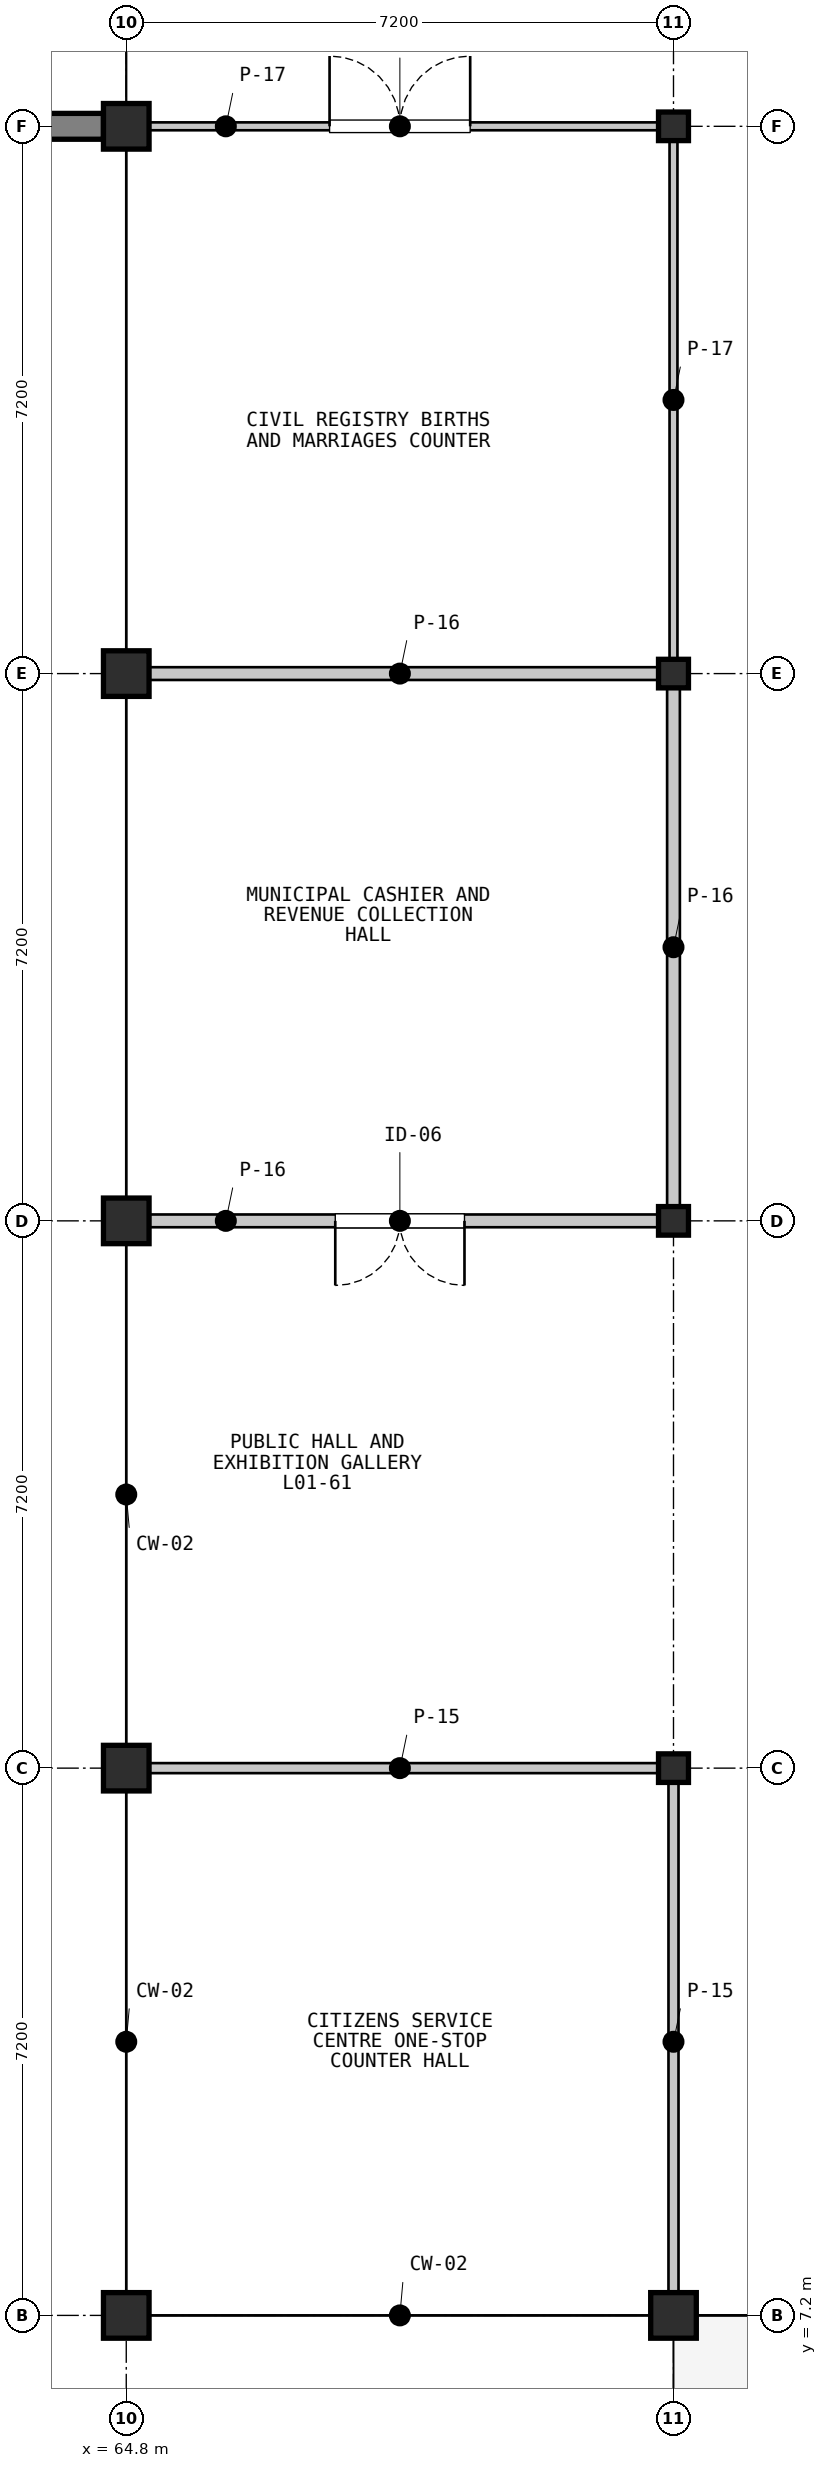
"""IFC4 building model, lengths in metres.
Left out: names, types, materials, properties, quantities, classifications, styles, units other than length and angle.
Written with IfcOpenShell. Run it as: python <this file> out.ifc"""

import sys

from ifc_helpers import new_model, si_unit, direction, frame, frame_2d, origin, origin_2d, place, context, subcontext, project, spatial, rectangle, i_section, extrude, element, fill, save


model = new_model("IFC4")
c1 = context("Model", 3, precision=1e-05, world=origin(), true_north=direction((0.0, 1.0)))
c2 = subcontext(c1, "Body", "Model", "MODEL_VIEW")
j1 = project(units=[si_unit("LENGTHUNIT", "METRE"), si_unit("PLANEANGLEUNIT", "RADIAN")], contexts=[c1])
p1 = place(None, origin())
s1 = spatial("IfcSite", under=j1, at=p1, CompositionType="ELEMENT")
p2 = place(p1, origin())
s2 = spatial("IfcBuilding", under=s1, at=p2, CompositionType="ELEMENT")
p3 = place(p2, origin())
s3 = spatial("IfcBuildingStorey", under=s2, at=p3, CompositionType="ELEMENT", Elevation=0.0)
for number, where, z_axis, x_axis in (
    (1, (64.8, 7.2, 0.0), (0.0, 0.0, 1.0), (1.0, 0.0, 0.0)),
    (2, (64.8, 14.4, 0.0), (0.0, 0.0, 1.0), (1.0, 0.0, 0.0)),
    (3, (64.8, 21.6, 0.0), (0.0, 0.0, 1.0), (1.0, 0.0, 0.0)),
    (4, (64.8, 28.8, 0.0), (0.0, 0.0, 1.0), (1.0, 0.0, 0.0)),
    (5, (64.8, 36.0, 0.0), (0.0, 0.0, 1.0), (1.0, 0.0, 0.0)),
    (6, (72.0, 7.2, 0.0), (0.0, 0.0, 1.0), (1.0, 0.0, 0.0)),
):
    element("IfcColumn", number, at=place(p3, frame(where, z_axis=z_axis, x_axis=x_axis)), inside=s3, PredefinedType="COLUMN", context=c2, shape_type="SweptSolid", body=[
        extrude(rectangle(XDim=0.6, YDim=0.6, at=origin_2d()), origin(), (0.0, 0.0, 1.0), 5.4),
    ])
for number, where, z_axis, x_axis in (
    (7, (72.0, 14.4, 0.0), (0.0, 0.0, 1.0), (1.0, 0.0, 0.0)),
    (8, (72.0, 21.6, 0.0), (0.0, 0.0, 1.0), (1.0, 0.0, 0.0)),
    (9, (72.0, 28.8, 0.0), (0.0, 0.0, 1.0), (1.0, 0.0, 0.0)),
    (10, (72.0, 36.0, 0.0), (0.0, 0.0, 1.0), (1.0, 0.0, 0.0)),
):
    element("IfcColumn", number, at=place(p3, frame(where, z_axis=z_axis, x_axis=x_axis)), inside=s3, PredefinedType="COLUMN", context=c2, shape_type="SweptSolid", body=[
        extrude(i_section(OverallWidth=0.394, OverallDepth=0.376, WebThickness=0.017, FlangeThickness=0.028, FilletRadius=0.015, at=origin_2d()), origin(), (0.0, 0.0, 1.0), 5.4),
    ])
p4 = place(p3, frame((64.5, 36.0, 0.0), z_axis=(0.0, 0.0, 1.0), x_axis=(-1.0, 0.0, 0.0)))
e11 = element("IfcWall", 11, at=p4, inside=s3, PredefinedType="SOLIDWALL", context=c2, shape_type="SweptSolid", body=[
    extrude(rectangle(XDim=6.6, YDim=0.34, at=frame_2d((3.3, 0.0))), origin(), (0.0, 0.0, 1.0), 4.598),
])
p5 = place(p4, frame((0.984, 0.0, 0.95)))
e12 = element("IfcOpeningElement", 12, at=p5, cuts=e11, PredefinedType="OPENING", context=c2, shape_type="SweptSolid", body=[
    extrude(rectangle(XDim=1.2, YDim=1.7, at=frame_2d((0.6, 0.85))), frame((0.0, 0.18, 0.0), z_axis=(0.0, -1.0, 0.0), x_axis=(1.0, 0.0, 0.0)), (0.0, 0.0, 1.0), 0.36),
])
p6 = place(p4, frame((4.416, 0.0, 0.95)))
e13 = element("IfcOpeningElement", 13, at=p6, cuts=e11, PredefinedType="OPENING", context=c2, shape_type="SweptSolid", body=[
    extrude(rectangle(XDim=1.2, YDim=1.7, at=frame_2d((0.6, 0.85))), frame((0.0, 0.18, 0.0), z_axis=(0.0, -1.0, 0.0), x_axis=(1.0, 0.0, 0.0)), (0.0, 0.0, 1.0), 0.36),
])
for number, where, z_axis, x_axis in (
    (14, (64.92, 14.4, 0.0), (0.0, 0.0, 1.0), (1.0, 0.0, 0.0)),
    (15, (72.0, 14.28, 0.0), (0.0, 0.0, 1.0), (0.0, -1.0, 0.0)),
):
    element("IfcWall", number, at=place(p3, frame(where, z_axis=z_axis, x_axis=x_axis)), inside=s3, PredefinedType="PARTITIONING", context=c2, shape_type="SweptSolid", body=[
        extrude(rectangle(XDim=6.96, YDim=0.132, at=frame_2d((3.48, 0.0))), origin(), (0.0, 0.0, 1.0), 2.035),
    ])
p7 = place(p3, frame((71.88, 21.6, 0.0), z_axis=(0.0, 0.0, 1.0), x_axis=(-1.0, 0.0, 0.0)))
e16 = element("IfcWall", 16, at=p7, inside=s3, PredefinedType="PARTITIONING", context=c2, shape_type="SweptSolid", body=[
    extrude(rectangle(XDim=6.96, YDim=0.168, at=frame_2d((3.48, 0.0))), origin(), (0.0, 0.0, 1.0), 4.164),
])
p8 = place(p7, frame((2.63, 0.0, 0.0)))
e17 = element("IfcOpeningElement", 17, at=p8, cuts=e16, PredefinedType="OPENING", context=c2, shape_type="SweptSolid", body=[
    extrude(rectangle(XDim=1.7, YDim=2.35, at=frame_2d((0.85, 1.175))), frame((0.0, 0.094, 0.0), z_axis=(0.0, -1.0, 0.0), x_axis=(1.0, 0.0, 0.0)), (0.0, 0.0, 1.0), 0.188),
])
for number, where, z_axis, x_axis in (
    (18, (64.92, 28.8, 0.0), (0.0, 0.0, 1.0), (1.0, 0.0, 0.0)),
    (19, (72.0, 28.68, 0.0), (0.0, 0.0, 1.0), (0.0, -1.0, 0.0)),
):
    element("IfcWall", number, at=place(p3, frame(where, z_axis=z_axis, x_axis=x_axis)), inside=s3, PredefinedType="PARTITIONING", context=c2, shape_type="SweptSolid", body=[
        extrude(rectangle(XDim=6.96, YDim=0.168, at=frame_2d((3.48, 0.0))), origin(), (0.0, 0.0, 1.0), 4.588),
    ])
p9 = place(p3, frame((64.92, 36.0, 0.0), z_axis=(0.0, 0.0, 1.0), x_axis=(1.0, 0.0, 0.0)))
e20 = element("IfcWall", 20, at=p9, inside=s3, PredefinedType="PARTITIONING", context=c2, shape_type="SweptSolid", body=[
    extrude(rectangle(XDim=6.96, YDim=0.104, at=frame_2d((3.48, 0.0))), origin(), (0.0, 0.0, 1.0), 4.588),
])
p10 = place(p9, frame((2.555, 0.0, 0.0)))
e21 = element("IfcOpeningElement", 21, at=p10, cuts=e20, PredefinedType="OPENING", context=c2, shape_type="SweptSolid", body=[
    extrude(rectangle(XDim=1.85, YDim=2.45, at=frame_2d((0.925, 1.225))), frame((0.0, 0.062, 0.0), z_axis=(0.0, -1.0, 0.0), x_axis=(1.0, 0.0, 0.0)), (0.0, 0.0, 1.0), 0.124),
])
p11 = place(p3, frame((72.0, 35.88, 0.0), z_axis=(0.0, 0.0, 1.0), x_axis=(0.0, -1.0, 0.0)))
e22 = element("IfcWall", 22, at=p11, inside=s3, PredefinedType="PARTITIONING", context=c2, shape_type="SweptSolid", body=[
    extrude(rectangle(XDim=6.96, YDim=0.104, at=frame_2d((3.48, 0.0))), origin(), (0.0, 0.0, 1.0), 4.588),
])
p12 = place(p8, origin())
e23 = element("IfcDoor", 23, at=p12, inside=s3, OperationType="DOUBLE_DOOR_SINGLE_SWING", PredefinedType="DOOR", context=c2, shape_type="SweptSolid", body=[
    extrude(rectangle(XDim=1.7, YDim=2.35, at=frame_2d((0.85, 1.175))), frame((0.0, 0.025, 0.0), z_axis=(0.0, -1.0, 0.0), x_axis=(1.0, 0.0, 0.0)), (0.0, 0.0, 1.0), 0.05),
])
fill(e17, e23)
p13 = place(p10, origin())
e24 = element("IfcDoor", 24, at=p13, inside=s3, OperationType="DOUBLE_DOOR_SINGLE_SWING", PredefinedType="DOOR", context=c2, shape_type="SweptSolid", body=[
    extrude(rectangle(XDim=1.85, YDim=2.45, at=frame_2d((0.925, 1.225))), frame((0.0, 0.025, 0.0), z_axis=(0.0, -1.0, 0.0), x_axis=(1.0, 0.0, 0.0)), (0.0, 0.0, 1.0), 0.05),
])
fill(e21, e24)
save(model, sys.argv[1])
